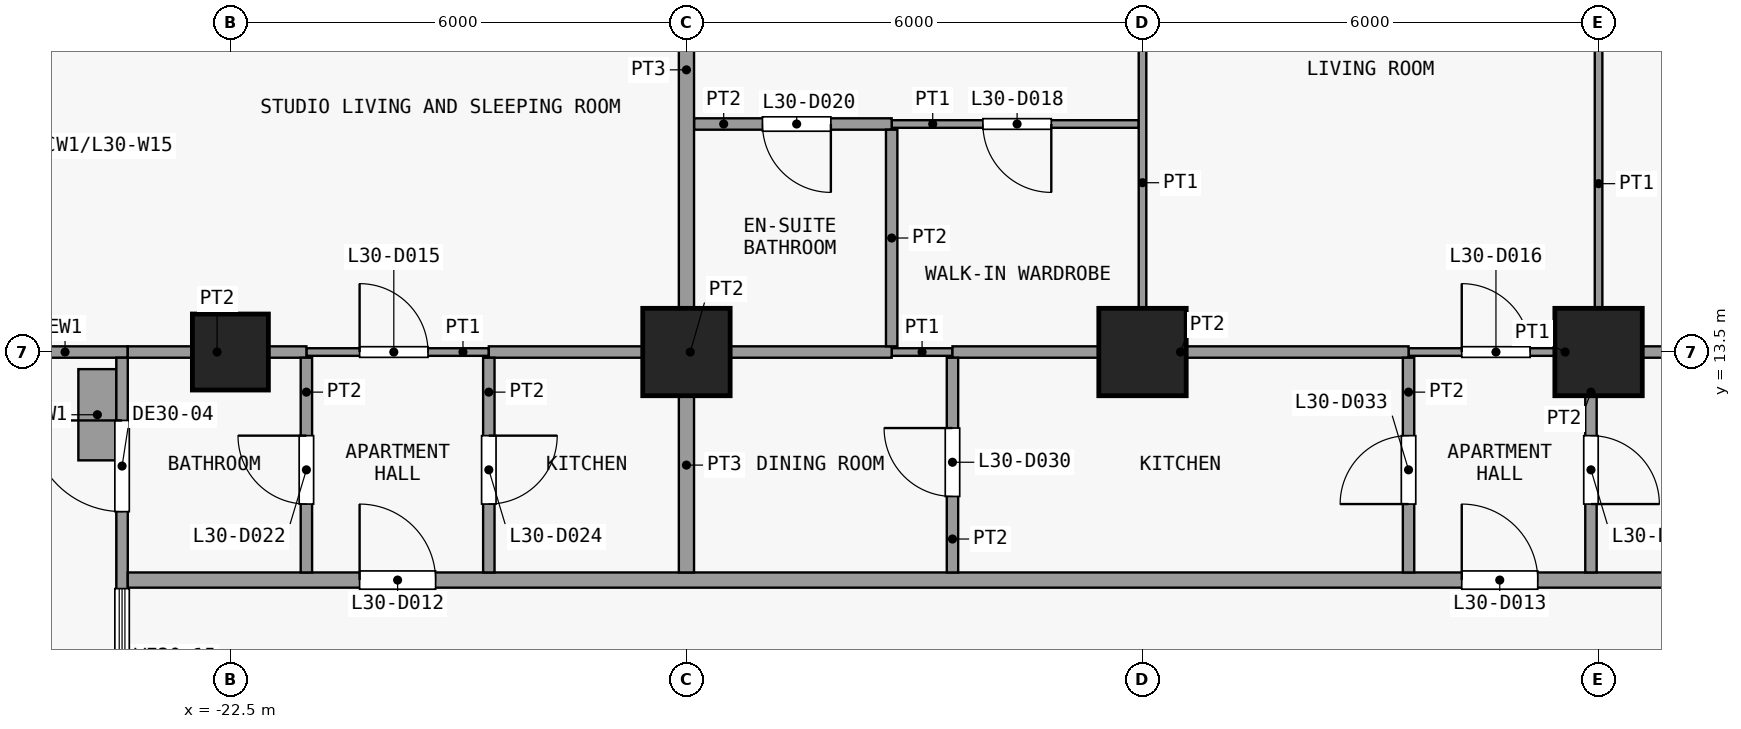
"""IFC4 building model, lengths in metres.
Left out: names, types, materials, properties, quantities, classifications, styles, units other than length and angle.
Written with IfcOpenShell. Run it as: python <this file> out.ifc"""

import sys

from ifc_helpers import new_model, si_unit, direction, frame, frame_2d, origin, origin_2d, place, context, subcontext, project, spatial, rectangle, extrude, element, fill, save


model = new_model("IFC4")
c1 = context("Model", 3, precision=1e-05, world=origin(), true_north=direction((0.0, 1.0)))
c2 = subcontext(c1, "Body", "Model", "MODEL_VIEW")
j1 = project(units=[si_unit("LENGTHUNIT", "METRE"), si_unit("PLANEANGLEUNIT", "RADIAN")], contexts=[c1])
p1 = place(None, origin())
s1 = spatial("IfcSite", under=j1, at=p1, CompositionType="ELEMENT")
p2 = place(p1, origin())
s2 = spatial("IfcBuilding", under=s1, at=p2, CompositionType="ELEMENT")
p3 = place(p2, frame((0.0, 0.0, 120.7)))
s3 = spatial("IfcBuildingStorey", under=s2, at=p3, CompositionType="ELEMENT", Elevation=120.7)
p4 = place(p3, frame((-22.5, 13.5, 0.0), z_axis=(0.0, 0.0, 1.0), x_axis=(1.0, 0.0, 0.0)))
e1 = element("IfcColumn", 1, at=p4, inside=s3, PredefinedType="COLUMN", context=c2, shape_type="SweptSolid", body=[
    extrude(rectangle(XDim=1.0, YDim=1.0, at=origin_2d()), origin(), (0.0, 0.0, 1.0), 3.6),
])
for number, where, z_axis, x_axis in (
    (2, (-16.5, 13.5, 0.0), (0.0, 0.0, 1.0), (1.0, 0.0, 0.0)),
    (3, (-10.5, 13.5, 0.0), (0.0, 0.0, 1.0), (1.0, 0.0, 0.0)),
    (4, (-4.5, 13.5, 0.0), (0.0, 0.0, 1.0), (1.0, 0.0, 0.0)),
):
    element("IfcColumn", number, at=place(p3, frame(where, z_axis=z_axis, x_axis=x_axis)), inside=s3, PredefinedType="COLUMN", context=c2, shape_type="SweptSolid", body=[
        extrude(rectangle(XDim=1.15, YDim=1.15, at=origin_2d()), origin(), (0.0, 0.0, 1.0), 3.6),
    ])
p5 = place(p3, frame((-23.85, 13.5, 0.0), z_axis=(0.0, 0.0, 1.0), x_axis=(-1.0, 0.0, 0.0)))
e5 = element("IfcWall", 5, at=p5, inside=s3, PredefinedType="SOLIDWALL", context=c2, shape_type="SweptSolid", body=[
    extrude(rectangle(XDim=1.65, YDim=0.15, at=frame_2d((0.825, 0.0))), origin(), (0.0, 0.0, 1.0), 3.3),
])
p6 = place(p3, frame((-23.925, 7.575, 0.0), z_axis=(0.0, 0.0, 1.0), x_axis=(0.0, 1.0, 0.0)))
e6 = element("IfcWall", 6, at=p6, inside=s3, PredefinedType="SOLIDWALL", context=c2, shape_type="SweptSolid", body=[
    extrude(rectangle(XDim=5.85, YDim=0.15, at=frame_2d((2.925, 0.0))), origin(), (0.0, 0.0, 1.0), 3.3),
])
p7 = place(p6, frame((3.825, 0.0, 0.0)))
e7 = element("IfcOpeningElement", 7, at=p7, cuts=e6, PredefinedType="OPENING", context=c2, shape_type="SweptSolid", body=[
    extrude(rectangle(XDim=1.2, YDim=2.4, at=frame_2d((0.6, 1.2))), frame((0.0, 0.085, 0.0), z_axis=(0.0, -1.0, 0.0), x_axis=(1.0, 0.0, 0.0)), (0.0, 0.0, 1.0), 0.17),
])
p8 = place(p6, frame((1.012, 0.0, 0.9)))
e8 = element("IfcOpeningElement", 8, at=p8, cuts=e6, PredefinedType="OPENING", context=c2, shape_type="SweptSolid", body=[
    extrude(rectangle(XDim=1.8, YDim=2.1, at=frame_2d((0.9, 1.05))), frame((0.0, 0.085, 0.0), z_axis=(0.0, -1.0, 0.0), x_axis=(1.0, 0.0, 0.0)), (0.0, 0.0, 1.0), 0.17),
])
p9 = place(p3, frame((-24.25, 12.075, 0.0), z_axis=(0.0, 0.0, 1.0), x_axis=(0.0, 1.0, 0.0)))
e9 = element("IfcWall", 9, at=p9, inside=s3, PredefinedType="USERDEFINED", context=c2, shape_type="SweptSolid", body=[
    extrude(rectangle(XDim=1.2, YDim=0.5, at=frame_2d((0.6, 0.0))), origin(), (0.0, 0.0, 1.0), 0.9),
])
p10 = place(p3, frame((-23.85, 10.5, 0.0), z_axis=(0.0, 0.0, 1.0), x_axis=(1.0, 0.0, 0.0)))
e10 = element("IfcWall", 10, at=p10, inside=s3, PredefinedType="PARTITIONING", context=c2, shape_type="SweptSolid", body=[
    extrude(rectangle(XDim=50.1, YDim=0.2, at=frame_2d((25.05, 0.0))), origin(), (0.0, 0.0, 1.0), 3.3),
])
p11 = place(p10, frame((3.05, 0.0, 0.0)))
e11 = element("IfcOpeningElement", 11, at=p11, cuts=e10, PredefinedType="OPENING", context=c2, shape_type="SweptSolid", body=[
    extrude(rectangle(XDim=1.0, YDim=2.1, at=frame_2d((0.5, 1.05))), frame((0.0, 0.11, 0.0), z_axis=(0.0, -1.0, 0.0), x_axis=(1.0, 0.0, 0.0)), (0.0, 0.0, 1.0), 0.22),
])
p12 = place(p10, frame((17.55, 0.0, 0.0)))
e12 = element("IfcOpeningElement", 12, at=p12, cuts=e10, PredefinedType="OPENING", context=c2, shape_type="SweptSolid", body=[
    extrude(rectangle(XDim=1.0, YDim=2.1, at=frame_2d((0.5, 1.05))), frame((0.0, 0.11, 0.0), z_axis=(0.0, -1.0, 0.0), x_axis=(1.0, 0.0, 0.0)), (0.0, 0.0, 1.0), 0.22),
])
p13 = place(p10, frame((37.55, 0.0, 0.0)))
e13 = element("IfcOpeningElement", 13, at=p13, cuts=e10, PredefinedType="OPENING", context=c2, shape_type="SweptSolid", body=[
    extrude(rectangle(XDim=1.0, YDim=2.1, at=frame_2d((0.5, 1.05))), frame((0.0, 0.11, 0.0), z_axis=(0.0, -1.0, 0.0), x_axis=(1.0, 0.0, 0.0)), (0.0, 0.0, 1.0), 0.22),
])
p14 = place(p3, frame((-21.5, 13.5, 0.0), z_axis=(0.0, 0.0, 1.0), x_axis=(1.0, 0.0, 0.0)))
e14 = element("IfcWall", 14, at=p14, inside=s3, PredefinedType="PARTITIONING", context=c2, shape_type="SweptSolid", body=[
    extrude(rectangle(XDim=2.4, YDim=0.1, at=frame_2d((1.2, 0.0))), origin(), (0.0, 0.0, 1.0), 3.3),
])
p15 = place(p14, frame((0.7, 0.0, 0.0)))
e15 = element("IfcOpeningElement", 15, at=p15, cuts=e14, PredefinedType="OPENING", context=c2, shape_type="SweptSolid", body=[
    extrude(rectangle(XDim=0.9, YDim=2.1, at=frame_2d((0.45, 1.05))), frame((0.0, 0.06, 0.0), z_axis=(0.0, -1.0, 0.0), x_axis=(1.0, 0.0, 0.0)), (0.0, 0.0, 1.0), 0.12),
])
p16 = place(p3, frame((-13.8, 13.5, 0.0), z_axis=(0.0, 0.0, 1.0), x_axis=(1.0, 0.0, 0.0)))
e16 = element("IfcWall", 16, at=p16, inside=s3, PredefinedType="PARTITIONING", context=c2, shape_type="SweptSolid", body=[
    extrude(rectangle(XDim=0.8, YDim=0.1, at=frame_2d((0.4, 0.0))), origin(), (0.0, 0.0, 1.0), 3.3),
])
p17 = place(p3, frame((-7.0, 13.5, 0.0), z_axis=(0.0, 0.0, 1.0), x_axis=(1.0, 0.0, 0.0)))
e17 = element("IfcWall", 17, at=p17, inside=s3, PredefinedType="PARTITIONING", context=c2, shape_type="SweptSolid", body=[
    extrude(rectangle(XDim=2.4, YDim=0.1, at=frame_2d((1.2, 0.0))), origin(), (0.0, 0.0, 1.0), 3.3),
])
p18 = place(p17, frame((0.7, 0.0, 0.0)))
e18 = element("IfcOpeningElement", 18, at=p18, cuts=e17, PredefinedType="OPENING", context=c2, shape_type="SweptSolid", body=[
    extrude(rectangle(XDim=0.9, YDim=2.1, at=frame_2d((0.45, 1.05))), frame((0.0, 0.06, 0.0), z_axis=(0.0, -1.0, 0.0), x_axis=(1.0, 0.0, 0.0)), (0.0, 0.0, 1.0), 0.12),
])
p19 = place(p3, frame((-23.85, 13.5, 0.0), z_axis=(0.0, 0.0, 1.0), x_axis=(1.0, 0.0, 0.0)))
e19 = element("IfcWall", 19, at=p19, inside=s3, PredefinedType="PARTITIONING", context=c2, shape_type="SweptSolid", body=[
    extrude(rectangle(XDim=2.35, YDim=0.15, at=frame_2d((1.175, 0.0))), origin(), (0.0, 0.0, 1.0), 3.3),
])
p20 = place(p3, frame((-19.1, 13.5, 0.0), z_axis=(0.0, 0.0, 1.0), x_axis=(1.0, 0.0, 0.0)))
e20 = element("IfcWall", 20, at=p20, inside=s3, PredefinedType="PARTITIONING", context=c2, shape_type="SweptSolid", body=[
    extrude(rectangle(XDim=5.3, YDim=0.15, at=frame_2d((2.65, 0.0))), origin(), (0.0, 0.0, 1.0), 3.3),
])
p21 = place(p3, frame((-13.0, 13.5, 0.0), z_axis=(0.0, 0.0, 1.0), x_axis=(1.0, 0.0, 0.0)))
e21 = element("IfcWall", 21, at=p21, inside=s3, PredefinedType="PARTITIONING", context=c2, shape_type="SweptSolid", body=[
    extrude(rectangle(XDim=6.0, YDim=0.15, at=frame_2d((3.0, 0.0))), origin(), (0.0, 0.0, 1.0), 3.3),
])
p22 = place(p3, frame((-4.5, 13.5, 0.0), z_axis=(0.0, 0.0, 1.0), x_axis=(1.0, 0.0, 0.0)))
e22 = element("IfcWall", 22, at=p22, inside=s3, PredefinedType="PARTITIONING", context=c2, shape_type="SweptSolid", body=[
    extrude(rectangle(XDim=7.4, YDim=0.15, at=frame_2d((3.7, 0.0))), origin(), (0.0, 0.0, 1.0), 3.3),
])
p23 = place(p3, frame((-13.8, 16.5, 0.0), z_axis=(0.0, 0.0, 1.0), x_axis=(1.0, 0.0, 0.0)))
e23 = element("IfcWall", 23, at=p23, inside=s3, PredefinedType="PARTITIONING", context=c2, shape_type="SweptSolid", body=[
    extrude(rectangle(XDim=3.25, YDim=0.1, at=frame_2d((1.625, 0.0))), origin(), (0.0, 0.0, 1.0), 3.3),
])
p24 = place(p23, frame((1.2, 0.0, 0.0)))
e24 = element("IfcOpeningElement", 24, at=p24, cuts=e23, PredefinedType="OPENING", context=c2, shape_type="SweptSolid", body=[
    extrude(rectangle(XDim=0.9, YDim=2.1, at=frame_2d((0.45, 1.05))), frame((0.0, 0.06, 0.0), z_axis=(0.0, -1.0, 0.0), x_axis=(1.0, 0.0, 0.0)), (0.0, 0.0, 1.0), 0.12),
])
p25 = place(p3, frame((-16.4, 16.5, 0.0), z_axis=(0.0, 0.0, 1.0), x_axis=(1.0, 0.0, 0.0)))
e25 = element("IfcWall", 25, at=p25, inside=s3, PredefinedType="PARTITIONING", context=c2, shape_type="SweptSolid", body=[
    extrude(rectangle(XDim=2.6, YDim=0.15, at=frame_2d((1.3, 0.0))), origin(), (0.0, 0.0, 1.0), 3.3),
])
p26 = place(p25, frame((0.9, 0.0, 0.0)))
e26 = element("IfcOpeningElement", 26, at=p26, cuts=e25, PredefinedType="OPENING", context=c2, shape_type="SweptSolid", body=[
    extrude(rectangle(XDim=0.9, YDim=2.1, at=frame_2d((0.45, 1.05))), frame((0.0, 0.085, 0.0), z_axis=(0.0, -1.0, 0.0), x_axis=(1.0, 0.0, 0.0)), (0.0, 0.0, 1.0), 0.17),
])
p27 = place(p3, frame((-21.5, 10.6, 0.0), z_axis=(0.0, 0.0, 1.0), x_axis=(0.0, 1.0, 0.0)))
e27 = element("IfcWall", 27, at=p27, inside=s3, PredefinedType="PARTITIONING", context=c2, shape_type="SweptSolid", body=[
    extrude(rectangle(XDim=2.825, YDim=0.15, at=frame_2d((1.413, 0.0))), origin(), (0.0, 0.0, 1.0), 3.3),
])
p28 = place(p27, frame((0.9, 0.0, 0.0)))
e28 = element("IfcOpeningElement", 28, at=p28, cuts=e27, PredefinedType="OPENING", context=c2, shape_type="SweptSolid", body=[
    extrude(rectangle(XDim=0.9, YDim=2.1, at=frame_2d((0.45, 1.05))), frame((0.0, 0.085, 0.0), z_axis=(0.0, -1.0, 0.0), x_axis=(1.0, 0.0, 0.0)), (0.0, 0.0, 1.0), 0.17),
])
p29 = place(p3, frame((-19.1, 10.6, 0.0), z_axis=(0.0, 0.0, 1.0), x_axis=(0.0, 1.0, 0.0)))
e29 = element("IfcWall", 29, at=p29, inside=s3, PredefinedType="PARTITIONING", context=c2, shape_type="SweptSolid", body=[
    extrude(rectangle(XDim=2.825, YDim=0.15, at=frame_2d((1.413, 0.0))), origin(), (0.0, 0.0, 1.0), 3.3),
])
p30 = place(p29, frame((0.9, 0.0, 0.0)))
e30 = element("IfcOpeningElement", 30, at=p30, cuts=e29, PredefinedType="OPENING", context=c2, shape_type="SweptSolid", body=[
    extrude(rectangle(XDim=0.9, YDim=2.1, at=frame_2d((0.45, 1.05))), frame((0.0, 0.085, 0.0), z_axis=(0.0, -1.0, 0.0), x_axis=(1.0, 0.0, 0.0)), (0.0, 0.0, 1.0), 0.17),
])
p31 = place(p3, frame((-16.5, 10.6, 0.0), z_axis=(0.0, 0.0, 1.0), x_axis=(0.0, 1.0, 0.0)))
e31 = element("IfcWall", 31, at=p31, inside=s3, PredefinedType="PARTITIONING", context=c2, shape_type="SweptSolid", body=[
    extrude(rectangle(XDim=2.825, YDim=0.2, at=frame_2d((1.413, 0.0))), origin(), (0.0, 0.0, 1.0), 3.3),
])
p32 = place(p3, frame((-16.5, 13.575, 0.0), z_axis=(0.0, 0.0, 1.0), x_axis=(0.0, 1.0, 0.0)))
e32 = element("IfcWall", 32, at=p32, inside=s3, PredefinedType="PARTITIONING", context=c2, shape_type="SweptSolid", body=[
    extrude(rectangle(XDim=7.275, YDim=0.2, at=frame_2d((3.638, 0.0))), origin(), (0.0, 0.0, 1.0), 3.3),
])
p33 = place(p3, frame((-13.8, 13.575, 0.0), z_axis=(0.0, 0.0, 1.0), x_axis=(0.0, 1.0, 0.0)))
e33 = element("IfcWall", 33, at=p33, inside=s3, PredefinedType="PARTITIONING", context=c2, shape_type="SweptSolid", body=[
    extrude(rectangle(XDim=2.85, YDim=0.15, at=frame_2d((1.425, 0.0))), origin(), (0.0, 0.0, 1.0), 3.3),
])
p34 = place(p3, frame((-13.0, 10.6, 0.0), z_axis=(0.0, 0.0, 1.0), x_axis=(0.0, 1.0, 0.0)))
e34 = element("IfcWall", 34, at=p34, inside=s3, PredefinedType="PARTITIONING", context=c2, shape_type="SweptSolid", body=[
    extrude(rectangle(XDim=2.825, YDim=0.15, at=frame_2d((1.413, 0.0))), origin(), (0.0, 0.0, 1.0), 3.3),
])
p35 = place(p34, frame((1.0, 0.0, 0.0)))
e35 = element("IfcOpeningElement", 35, at=p35, cuts=e34, PredefinedType="OPENING", context=c2, shape_type="SweptSolid", body=[
    extrude(rectangle(XDim=0.9, YDim=2.1, at=frame_2d((0.45, 1.05))), frame((0.0, 0.085, 0.0), z_axis=(0.0, -1.0, 0.0), x_axis=(1.0, 0.0, 0.0)), (0.0, 0.0, 1.0), 0.17),
])
p36 = place(p3, frame((-10.5, 13.575, 0.0), z_axis=(0.0, 0.0, 1.0), x_axis=(0.0, 1.0, 0.0)))
e36 = element("IfcWall", 36, at=p36, inside=s3, PredefinedType="PARTITIONING", context=c2, shape_type="SweptSolid", body=[
    extrude(rectangle(XDim=7.275, YDim=0.1, at=frame_2d((3.638, 0.0))), origin(), (0.0, 0.0, 1.0), 3.3),
])
p37 = place(p36, frame((4.425, 0.0, 0.0)))
e37 = element("IfcOpeningElement", 37, at=p37, cuts=e36, PredefinedType="OPENING", context=c2, shape_type="SweptSolid", body=[
    extrude(rectangle(XDim=0.9, YDim=2.1, at=frame_2d((0.45, 1.05))), frame((0.0, 0.06, 0.0), z_axis=(0.0, -1.0, 0.0), x_axis=(1.0, 0.0, 0.0)), (0.0, 0.0, 1.0), 0.12),
])
p38 = place(p3, frame((-7.0, 10.6, 0.0), z_axis=(0.0, 0.0, 1.0), x_axis=(0.0, 1.0, 0.0)))
e38 = element("IfcWall", 38, at=p38, inside=s3, PredefinedType="PARTITIONING", context=c2, shape_type="SweptSolid", body=[
    extrude(rectangle(XDim=2.825, YDim=0.15, at=frame_2d((1.413, 0.0))), origin(), (0.0, 0.0, 1.0), 3.3),
])
p39 = place(p38, frame((0.9, 0.0, 0.0)))
e39 = element("IfcOpeningElement", 39, at=p39, cuts=e38, PredefinedType="OPENING", context=c2, shape_type="SweptSolid", body=[
    extrude(rectangle(XDim=0.9, YDim=2.1, at=frame_2d((0.45, 1.05))), frame((0.0, 0.085, 0.0), z_axis=(0.0, -1.0, 0.0), x_axis=(1.0, 0.0, 0.0)), (0.0, 0.0, 1.0), 0.17),
])
p40 = place(p3, frame((-4.6, 10.6, 0.0), z_axis=(0.0, 0.0, 1.0), x_axis=(0.0, 1.0, 0.0)))
e40 = element("IfcWall", 40, at=p40, inside=s3, PredefinedType="PARTITIONING", context=c2, shape_type="SweptSolid", body=[
    extrude(rectangle(XDim=2.825, YDim=0.15, at=frame_2d((1.413, 0.0))), origin(), (0.0, 0.0, 1.0), 3.3),
])
p41 = place(p40, frame((0.9, 0.0, 0.0)))
e41 = element("IfcOpeningElement", 41, at=p41, cuts=e40, PredefinedType="OPENING", context=c2, shape_type="SweptSolid", body=[
    extrude(rectangle(XDim=0.9, YDim=2.1, at=frame_2d((0.45, 1.05))), frame((0.0, 0.085, 0.0), z_axis=(0.0, -1.0, 0.0), x_axis=(1.0, 0.0, 0.0)), (0.0, 0.0, 1.0), 0.17),
])
p42 = place(p3, frame((-4.5, 13.575, 0.0), z_axis=(0.0, 0.0, 1.0), x_axis=(0.0, 1.0, 0.0)))
e42 = element("IfcWall", 42, at=p42, inside=s3, PredefinedType="PARTITIONING", context=c2, shape_type="SweptSolid", body=[
    extrude(rectangle(XDim=9.575, YDim=0.1, at=frame_2d((4.788, 0.0))), origin(), (0.0, 0.0, 1.0), 3.3),
])
p43 = place(p42, frame((4.4, 0.0, 0.0)))
e43 = element("IfcOpeningElement", 43, at=p43, cuts=e42, PredefinedType="OPENING", context=c2, shape_type="SweptSolid", body=[
    extrude(rectangle(XDim=0.9, YDim=2.1, at=frame_2d((0.45, 1.05))), frame((0.0, 0.06, 0.0), z_axis=(0.0, -1.0, 0.0), x_axis=(1.0, 0.0, 0.0)), (0.0, 0.0, 1.0), 0.12),
])
p44 = place(p7, origin())
e44 = element("IfcDoor", 44, at=p44, inside=s3, OperationType="SINGLE_SWING_RIGHT", PredefinedType="DOOR", context=c2, shape_type="SweptSolid", body=[
    extrude(rectangle(XDim=1.2, YDim=2.4, at=frame_2d((0.6, 1.2))), frame((0.0, 0.025, 0.0), z_axis=(0.0, -1.0, 0.0), x_axis=(1.0, 0.0, 0.0)), (0.0, 0.0, 1.0), 0.05),
])
fill(e7, e44)
p45 = place(p8, origin())
e45 = element("IfcWindow", 45, at=p45, inside=s3, PartitioningType="SINGLE_PANEL", PredefinedType="WINDOW", context=c2, shape_type="SweptSolid", body=[
    extrude(rectangle(XDim=1.8, YDim=2.1, at=frame_2d((0.9, 1.05))), frame((0.0, 0.03, 0.0), z_axis=(0.0, -1.0, 0.0), x_axis=(1.0, 0.0, 0.0)), (0.0, 0.0, 1.0), 0.06),
])
fill(e8, e45)
p46 = place(p11, origin())
e46 = element("IfcDoor", 46, at=p46, inside=s3, OperationType="SINGLE_SWING_RIGHT", PredefinedType="DOOR", context=c2, shape_type="SweptSolid", body=[
    extrude(rectangle(XDim=1.0, YDim=2.1, at=frame_2d((0.5, 1.05))), frame((0.0, 0.025, 0.0), z_axis=(0.0, -1.0, 0.0), x_axis=(1.0, 0.0, 0.0)), (0.0, 0.0, 1.0), 0.05),
])
fill(e11, e46)
p47 = place(p12, origin())
e47 = element("IfcDoor", 47, at=p47, inside=s3, OperationType="SINGLE_SWING_RIGHT", PredefinedType="DOOR", context=c2, shape_type="SweptSolid", body=[
    extrude(rectangle(XDim=1.0, YDim=2.1, at=frame_2d((0.5, 1.05))), frame((0.0, 0.025, 0.0), z_axis=(0.0, -1.0, 0.0), x_axis=(1.0, 0.0, 0.0)), (0.0, 0.0, 1.0), 0.05),
])
fill(e12, e47)
p48 = place(p15, origin())
e48 = element("IfcDoor", 48, at=p48, inside=s3, OperationType="SINGLE_SWING_RIGHT", PredefinedType="DOOR", context=c2, shape_type="SweptSolid", body=[
    extrude(rectangle(XDim=0.9, YDim=2.1, at=frame_2d((0.45, 1.05))), frame((0.0, 0.025, 0.0), z_axis=(0.0, -1.0, 0.0), x_axis=(1.0, 0.0, 0.0)), (0.0, 0.0, 1.0), 0.05),
])
fill(e15, e48)
p49 = place(p18, origin())
e49 = element("IfcDoor", 49, at=p49, inside=s3, OperationType="SINGLE_SWING_RIGHT", PredefinedType="DOOR", context=c2, shape_type="SweptSolid", body=[
    extrude(rectangle(XDim=0.9, YDim=2.1, at=frame_2d((0.45, 1.05))), frame((0.0, 0.025, 0.0), z_axis=(0.0, -1.0, 0.0), x_axis=(1.0, 0.0, 0.0)), (0.0, 0.0, 1.0), 0.05),
])
fill(e18, e49)
p50 = place(p24, origin())
e50 = element("IfcDoor", 50, at=p50, inside=s3, OperationType="SINGLE_SWING_RIGHT", PredefinedType="DOOR", context=c2, shape_type="SweptSolid", body=[
    extrude(rectangle(XDim=0.9, YDim=2.1, at=frame_2d((0.45, 1.05))), frame((0.0, 0.025, 0.0), z_axis=(0.0, -1.0, 0.0), x_axis=(1.0, 0.0, 0.0)), (0.0, 0.0, 1.0), 0.05),
])
fill(e24, e50)
p51 = place(p26, origin())
e51 = element("IfcDoor", 51, at=p51, inside=s3, OperationType="SINGLE_SWING_RIGHT", PredefinedType="DOOR", context=c2, shape_type="SweptSolid", body=[
    extrude(rectangle(XDim=0.9, YDim=2.1, at=frame_2d((0.45, 1.05))), frame((0.0, 0.025, 0.0), z_axis=(0.0, -1.0, 0.0), x_axis=(1.0, 0.0, 0.0)), (0.0, 0.0, 1.0), 0.05),
])
fill(e26, e51)
p52 = place(p28, origin())
e52 = element("IfcDoor", 52, at=p52, inside=s3, OperationType="SINGLE_SWING_LEFT", PredefinedType="DOOR", context=c2, shape_type="SweptSolid", body=[
    extrude(rectangle(XDim=0.9, YDim=2.1, at=frame_2d((0.45, 1.05))), frame((0.0, 0.025, 0.0), z_axis=(0.0, -1.0, 0.0), x_axis=(1.0, 0.0, 0.0)), (0.0, 0.0, 1.0), 0.05),
])
fill(e28, e52)
p53 = place(p30, origin())
e53 = element("IfcDoor", 53, at=p53, inside=s3, OperationType="SINGLE_SWING_RIGHT", PredefinedType="DOOR", context=c2, shape_type="SweptSolid", body=[
    extrude(rectangle(XDim=0.9, YDim=2.1, at=frame_2d((0.45, 1.05))), frame((0.0, 0.025, 0.0), z_axis=(0.0, -1.0, 0.0), x_axis=(1.0, 0.0, 0.0)), (0.0, 0.0, 1.0), 0.05),
])
fill(e30, e53)
p54 = place(p35, origin())
e54 = element("IfcDoor", 54, at=p54, inside=s3, OperationType="SINGLE_SWING_LEFT", PredefinedType="DOOR", context=c2, shape_type="SweptSolid", body=[
    extrude(rectangle(XDim=0.9, YDim=2.1, at=frame_2d((0.45, 1.05))), frame((0.0, 0.025, 0.0), z_axis=(0.0, -1.0, 0.0), x_axis=(1.0, 0.0, 0.0)), (0.0, 0.0, 1.0), 0.05),
])
fill(e35, e54)
p55 = place(p39, origin())
e55 = element("IfcDoor", 55, at=p55, inside=s3, OperationType="SINGLE_SWING_RIGHT", PredefinedType="DOOR", context=c2, shape_type="SweptSolid", body=[
    extrude(rectangle(XDim=0.9, YDim=2.1, at=frame_2d((0.45, 1.05))), frame((0.0, 0.025, 0.0), z_axis=(0.0, -1.0, 0.0), x_axis=(1.0, 0.0, 0.0)), (0.0, 0.0, 1.0), 0.05),
])
fill(e39, e55)
p56 = place(p41, origin())
e56 = element("IfcDoor", 56, at=p56, inside=s3, OperationType="SINGLE_SWING_LEFT", PredefinedType="DOOR", context=c2, shape_type="SweptSolid", body=[
    extrude(rectangle(XDim=0.9, YDim=2.1, at=frame_2d((0.45, 1.05))), frame((0.0, 0.025, 0.0), z_axis=(0.0, -1.0, 0.0), x_axis=(1.0, 0.0, 0.0)), (0.0, 0.0, 1.0), 0.05),
])
fill(e41, e56)
save(model, sys.argv[1])
